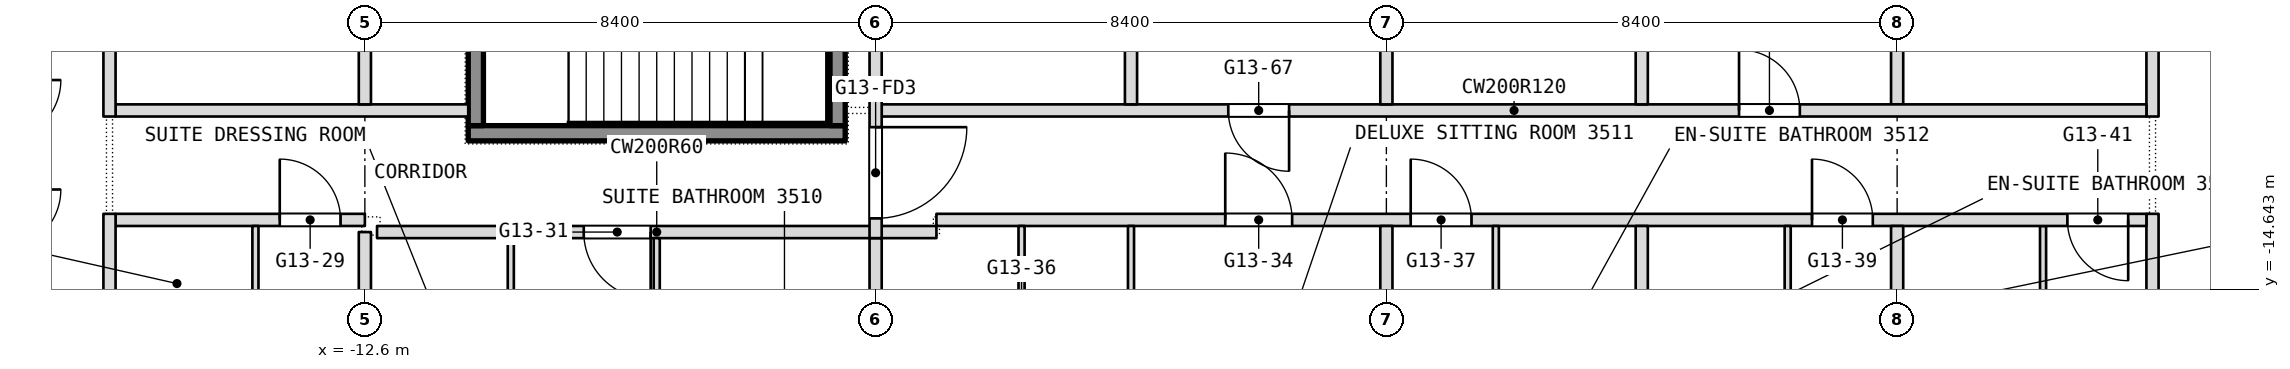
"""IFC4 building model, lengths in metres.
Left out: names, types, materials, properties, quantities, classifications, styles, units other than length and angle.
Written with IfcOpenShell. Run it as: python <this file> out.ifc"""

import sys

from ifc_helpers import new_model, si_unit, direction, frame, frame_2d, origin, place, context, subcontext, project, spatial, rectangle, extrude, element, fill, save


model = new_model("IFC4")
c1 = context("Model", 3, precision=1e-05, world=origin(), true_north=direction((0.0, 1.0)))
c2 = subcontext(c1, "Body", "Model", "MODEL_VIEW")
j1 = project(units=[si_unit("LENGTHUNIT", "METRE"), si_unit("PLANEANGLEUNIT", "RADIAN")], contexts=[c1])
p1 = place(None, origin())
s1 = spatial("IfcSite", under=j1, at=p1, CompositionType="ELEMENT")
p2 = place(p1, origin())
s2 = spatial("IfcBuilding", under=s1, at=p2, CompositionType="ELEMENT")
p3 = place(p2, frame((0.0, 0.0, 151.7)))
s3 = spatial("IfcBuildingStorey", under=s2, at=p3, CompositionType="ELEMENT", Elevation=151.7)
p4 = place(p3, frame((16.8, -22.186, 0.0), z_axis=(0.0, 0.0, 1.0), x_axis=(0.0, 1.0, 0.0)))
e1 = element("IfcWall", 1, at=p4, inside=s3, PredefinedType="PARTITIONING", context=c2, shape_type="SweptSolid", body=[
    extrude(rectangle(XDim=8.786, YDim=0.2, at=frame_2d((4.393, 0.0))), origin(), (0.0, 0.0, 1.0), 3.34),
])
p5 = place(p3, frame((16.8, -11.8, 0.0), z_axis=(0.0, 0.0, 1.0), x_axis=(0.0, 1.0, 0.0)))
e2 = element("IfcWall", 2, at=p5, inside=s3, PredefinedType="PARTITIONING", context=c2, shape_type="SweptSolid", body=[
    extrude(rectangle(XDim=9.9, YDim=0.2, at=frame_2d((4.95, 0.0))), origin(), (0.0, 0.0, 1.0), 3.34),
])
p6 = place(p3, frame((15.0, -16.85, 0.0), z_axis=(0.0, 0.0, 1.0), x_axis=(0.0, 1.0, 0.0)))
e3 = element("IfcWall", 3, at=p6, inside=s3, PredefinedType="PARTITIONING", context=c2, shape_type="SweptSolid", body=[
    extrude(rectangle(XDim=3.25, YDim=0.1, at=frame_2d((1.625, 0.0))), origin(), (0.0, 0.0, 1.0), 3.34),
])
p7 = place(p3, frame((-12.4, -13.7, 0.0), z_axis=(0.0, 0.0, 1.0), x_axis=(1.0, 0.0, 0.0)))
e4 = element("IfcWall", 4, at=p7, inside=s3, PredefinedType="PARTITIONING", context=c2, shape_type="SweptSolid", body=[
    extrude(rectangle(XDim=9.2, YDim=0.2, at=frame_2d((4.6, 0.0))), origin(), (0.0, 0.0, 1.0), 3.34),
])
p8 = place(p7, frame((3.4, 0.0, 0.0)))
e5 = element("IfcOpeningElement", 5, at=p8, cuts=e4, PredefinedType="OPENING", context=c2, shape_type="SweptSolid", body=[
    extrude(rectangle(XDim=1.1, YDim=2.1, at=frame_2d((0.55, 1.05))), frame((0.0, 0.1, 0.0), z_axis=(0.0, -1.0, 0.0), x_axis=(1.0, 0.0, 0.0)), (0.0, 0.0, 1.0), 0.2),
])
p9 = place(p3, frame((-16.7, -13.5, 0.0), z_axis=(0.0, 0.0, 1.0), x_axis=(1.0, 0.0, 0.0)))
e6 = element("IfcWall", 6, at=p9, inside=s3, PredefinedType="PARTITIONING", context=c2, shape_type="SweptSolid", body=[
    extrude(rectangle(XDim=4.1, YDim=0.2, at=frame_2d((2.05, 0.0))), origin(), (0.0, 0.0, 1.0), 3.34),
])
p10 = place(p9, frame((2.7, 0.0, 0.0)))
e7 = element("IfcOpeningElement", 7, at=p10, cuts=e6, PredefinedType="OPENING", context=c2, shape_type="SweptSolid", body=[
    extrude(rectangle(XDim=1.0, YDim=2.1, at=frame_2d((0.5, 1.05))), frame((0.0, 0.1, 0.0), z_axis=(0.0, -1.0, 0.0), x_axis=(1.0, 0.0, 0.0)), (0.0, 0.0, 1.0), 0.2),
])
p11 = place(p3, frame((-3.2, -13.5, 0.0), z_axis=(0.0, 0.0, 1.0), x_axis=(1.0, 0.0, 0.0)))
e8 = element("IfcWall", 8, at=p11, inside=s3, PredefinedType="PARTITIONING", context=c2, shape_type="SweptSolid", body=[
    extrude(rectangle(XDim=19.9, YDim=0.2, at=frame_2d((9.95, 0.0))), origin(), (0.0, 0.0, 1.0), 3.34),
])
p12 = place(p11, frame((4.75, 0.0, 0.0)))
e9 = element("IfcOpeningElement", 9, at=p12, cuts=e8, PredefinedType="OPENING", context=c2, shape_type="SweptSolid", body=[
    extrude(rectangle(XDim=1.1, YDim=2.1, at=frame_2d((0.55, 1.05))), frame((0.0, 0.1, 0.0), z_axis=(0.0, -1.0, 0.0), x_axis=(1.0, 0.0, 0.0)), (0.0, 0.0, 1.0), 0.2),
])
p13 = place(p11, frame((7.8, 0.0, 0.0)))
e10 = element("IfcOpeningElement", 10, at=p13, cuts=e8, PredefinedType="OPENING", context=c2, shape_type="SweptSolid", body=[
    extrude(rectangle(XDim=1.0, YDim=2.1, at=frame_2d((0.5, 1.05))), frame((0.0, 0.1, 0.0), z_axis=(0.0, -1.0, 0.0), x_axis=(1.0, 0.0, 0.0)), (0.0, 0.0, 1.0), 0.2),
])
p14 = place(p11, frame((14.4, 0.0, 0.0)))
e11 = element("IfcOpeningElement", 11, at=p14, cuts=e8, PredefinedType="OPENING", context=c2, shape_type="SweptSolid", body=[
    extrude(rectangle(XDim=1.0, YDim=2.1, at=frame_2d((0.5, 1.05))), frame((0.0, 0.1, 0.0), z_axis=(0.0, -1.0, 0.0), x_axis=(1.0, 0.0, 0.0)), (0.0, 0.0, 1.0), 0.2),
])
p15 = place(p11, frame((18.6, 0.0, 0.0)))
e12 = element("IfcOpeningElement", 12, at=p15, cuts=e8, PredefinedType="OPENING", context=c2, shape_type="SweptSolid", body=[
    extrude(rectangle(XDim=1.0, YDim=2.1, at=frame_2d((0.5, 1.05))), frame((0.0, 0.1, 0.0), z_axis=(0.0, -1.0, 0.0), x_axis=(1.0, 0.0, 0.0)), (0.0, 0.0, 1.0), 0.2),
])
p16 = place(p3, frame((12.6, -21.175, 0.0), z_axis=(0.0, 0.0, 1.0), x_axis=(0.0, 1.0, 0.0)))
e13 = element("IfcWall", 13, at=p16, inside=s3, PredefinedType="PARTITIONING", context=c2, shape_type="SweptSolid", body=[
    extrude(rectangle(XDim=7.575, YDim=0.2, at=frame_2d((3.788, 0.0))), origin(), (0.0, 0.0, 1.0), 3.34),
])
p17 = place(p3, frame((12.6, -11.6, 0.0), z_axis=(0.0, 0.0, 1.0), x_axis=(0.0, 1.0, 0.0)))
e14 = element("IfcWall", 14, at=p17, inside=s3, PredefinedType="PARTITIONING", context=c2, shape_type="SweptSolid", body=[
    extrude(rectangle(XDim=3.9, YDim=0.2, at=frame_2d((1.95, 0.0))), origin(), (0.0, 0.0, 1.0), 3.34),
])
p18 = place(p3, frame((-16.7, -11.7, 0.0), z_axis=(0.0, 0.0, 1.0), x_axis=(1.0, 0.0, 0.0)))
e15 = element("IfcWall", 15, at=p18, inside=s3, PredefinedType="PARTITIONING", context=c2, shape_type="SweptSolid", body=[
    extrude(rectangle(XDim=5.8, YDim=0.2, at=frame_2d((2.9, 0.0))), origin(), (0.0, 0.0, 1.0), 3.34),
])
p19 = place(p3, frame((-4.1, -11.7, 0.0), z_axis=(0.0, 0.0, 1.0), x_axis=(1.0, 0.0, 0.0)))
e16 = element("IfcWall", 16, at=p19, inside=s3, PredefinedType="PARTITIONING", context=c2, shape_type="SweptSolid", body=[
    extrude(rectangle(XDim=20.8, YDim=0.2, at=frame_2d((10.4, 0.0))), origin(), (0.0, 0.0, 1.0), 3.34),
])
p20 = place(p19, frame((14.1, 0.0, 0.0)))
e17 = element("IfcOpeningElement", 17, at=p20, cuts=e16, PredefinedType="OPENING", context=c2, shape_type="SweptSolid", body=[
    extrude(rectangle(XDim=1.0, YDim=2.1, at=frame_2d((0.5, 1.05))), frame((0.0, 0.1, 0.0), z_axis=(0.0, -1.0, 0.0), x_axis=(1.0, 0.0, 0.0)), (0.0, 0.0, 1.0), 0.2),
])
p21 = place(p19, frame((5.7, 0.0, 0.0)))
e18 = element("IfcOpeningElement", 18, at=p21, cuts=e16, PredefinedType="OPENING", context=c2, shape_type="SweptSolid", body=[
    extrude(rectangle(XDim=1.0, YDim=2.1, at=frame_2d((0.5, 1.05))), frame((0.0, 0.1, 0.0), z_axis=(0.0, -1.0, 0.0), x_axis=(1.0, 0.0, 0.0)), (0.0, 0.0, 1.0), 0.2),
])
p22 = place(p3, frame((10.8, -17.65, 0.0), z_axis=(0.0, 0.0, 1.0), x_axis=(0.0, 1.0, 0.0)))
e19 = element("IfcWall", 19, at=p22, inside=s3, PredefinedType="PARTITIONING", context=c2, shape_type="SweptSolid", body=[
    extrude(rectangle(XDim=4.05, YDim=0.1, at=frame_2d((2.025, 0.0))), origin(), (0.0, 0.0, 1.0), 3.34),
])
p23 = place(p3, frame((8.4, -23.3, 0.0), z_axis=(0.0, 0.0, 1.0), x_axis=(0.0, 1.0, 0.0)))
e20 = element("IfcWall", 20, at=p23, inside=s3, PredefinedType="PARTITIONING", context=c2, shape_type="SweptSolid", body=[
    extrude(rectangle(XDim=9.7, YDim=0.2, at=frame_2d((4.85, 0.0))), origin(), (0.0, 0.0, 1.0), 3.34),
])
p24 = place(p3, frame((8.4, -11.6, 0.0), z_axis=(0.0, 0.0, 1.0), x_axis=(0.0, 1.0, 0.0)))
e21 = element("IfcWall", 21, at=p24, inside=s3, PredefinedType="PARTITIONING", context=c2, shape_type="SweptSolid", body=[
    extrude(rectangle(XDim=3.8, YDim=0.2, at=frame_2d((1.9, 0.0))), origin(), (0.0, 0.0, 1.0), 3.34),
])
p25 = place(p3, frame((6.0, -17.75, 0.0), z_axis=(0.0, 0.0, 1.0), x_axis=(0.0, 1.0, 0.0)))
e22 = element("IfcWall", 22, at=p25, inside=s3, PredefinedType="PARTITIONING", context=c2, shape_type="SweptSolid", body=[
    extrude(rectangle(XDim=4.15, YDim=0.1, at=frame_2d((2.075, 0.0))), origin(), (0.0, 0.0, 1.0), 3.34),
])
p26 = place(p3, frame((4.2, -23.3, 0.0), z_axis=(0.0, 0.0, 1.0), x_axis=(0.0, 1.0, 0.0)))
e23 = element("IfcWall", 23, at=p26, inside=s3, PredefinedType="PARTITIONING", context=c2, shape_type="SweptSolid", body=[
    extrude(rectangle(XDim=9.7, YDim=0.2, at=frame_2d((4.85, 0.0))), origin(), (0.0, 0.0, 1.0), 3.34),
])
p27 = place(p3, frame((4.2, -11.6, 0.0), z_axis=(0.0, 0.0, 1.0), x_axis=(0.0, 1.0, 0.0)))
e24 = element("IfcWall", 24, at=p27, inside=s3, PredefinedType="PARTITIONING", context=c2, shape_type="SweptSolid", body=[
    extrude(rectangle(XDim=9.7, YDim=0.2, at=frame_2d((4.85, 0.0))), origin(), (0.0, 0.0, 1.0), 3.34),
])
p28 = place(p3, frame((0.0, -23.3, 0.0), z_axis=(0.0, 0.0, 1.0), x_axis=(0.0, 1.0, 0.0)))
e25 = element("IfcWall", 25, at=p28, inside=s3, PredefinedType="PARTITIONING", context=c2, shape_type="SweptSolid", body=[
    extrude(rectangle(XDim=9.7, YDim=0.1, at=frame_2d((4.85, 0.0))), origin(), (0.0, 0.0, 1.0), 3.34),
])
p29 = place(p28, frame((3.65, 0.0, 0.0)))
e26 = element("IfcOpeningElement", 26, at=p29, cuts=e25, PredefinedType="OPENING", context=c2, shape_type="SweptSolid", body=[
    extrude(rectangle(XDim=0.9, YDim=2.1, at=frame_2d((0.45, 1.05))), frame((0.0, 0.05, 0.0), z_axis=(0.0, -1.0, 0.0), x_axis=(1.0, 0.0, 0.0)), (0.0, 0.0, 1.0), 0.1),
])
p30 = place(p3, frame((0.0, -11.6, 0.0), z_axis=(0.0, 0.0, 1.0), x_axis=(0.0, 1.0, 0.0)))
e27 = element("IfcWall", 27, at=p30, inside=s3, PredefinedType="PARTITIONING", context=c2, shape_type="SweptSolid", body=[
    extrude(rectangle(XDim=9.7, YDim=0.2, at=frame_2d((4.85, 0.0))), origin(), (0.0, 0.0, 1.0), 3.34),
])
p31 = place(p3, frame((-1.8, -17.05, 0.0), z_axis=(0.0, 0.0, 1.0), x_axis=(0.0, 1.0, 0.0)))
e28 = element("IfcWall", 28, at=p31, inside=s3, PredefinedType="PARTITIONING", context=c2, shape_type="SweptSolid", body=[
    extrude(rectangle(XDim=3.45, YDim=0.1, at=frame_2d((1.725, 0.0))), origin(), (0.0, 0.0, 1.0), 3.34),
])
p32 = place(p31, frame((1.3, 0.0, 0.0)))
e29 = element("IfcOpeningElement", 29, at=p32, cuts=e28, PredefinedType="OPENING", context=c2, shape_type="SweptSolid", body=[
    extrude(rectangle(XDim=0.9, YDim=2.1, at=frame_2d((0.45, 1.05))), frame((0.0, 0.05, 0.0), z_axis=(0.0, -1.0, 0.0), x_axis=(1.0, 0.0, 0.0)), (0.0, 0.0, 1.0), 0.1),
])
p33 = place(p3, frame((-4.2, -23.3, 0.0), z_axis=(0.0, 0.0, 1.0), x_axis=(0.0, 1.0, 0.0)))
e30 = element("IfcWall", 30, at=p33, inside=s3, PredefinedType="PARTITIONING", context=c2, shape_type="SweptSolid", body=[
    extrude(rectangle(XDim=9.5, YDim=0.2, at=frame_2d((4.75, 0.0))), origin(), (0.0, 0.0, 1.0), 3.34),
])
p34 = place(p3, frame((-4.2, -13.8, 0.0), z_axis=(0.0, 0.0, 1.0), x_axis=(0.0, 1.0, 0.0)))
e31 = element("IfcWall", 31, at=p34, inside=s3, PredefinedType="PARTITIONING", context=c2, shape_type="SweptSolid", body=[
    extrude(rectangle(XDim=13.8, YDim=0.2, at=frame_2d((6.9, 0.0))), origin(), (0.0, 0.0, 1.0), 3.34),
])
p35 = place(p34, frame((12.15, 0.0, 0.0)))
e32 = element("IfcOpeningElement", 32, at=p35, cuts=e31, PredefinedType="OPENING", context=c2, shape_type="SweptSolid", body=[
    extrude(rectangle(XDim=1.5, YDim=2.1, at=frame_2d((0.75, 1.05))), frame((0.0, 0.1, 0.0), z_axis=(0.0, -1.0, 0.0), x_axis=(1.0, 0.0, 0.0)), (0.0, 0.0, 1.0), 0.2),
])
p36 = place(p34, frame((0.325, 0.0, 0.0)))
e33 = element("IfcOpeningElement", 33, at=p36, cuts=e31, PredefinedType="OPENING", context=c2, shape_type="SweptSolid", body=[
    extrude(rectangle(XDim=1.5, YDim=2.1, at=frame_2d((0.75, 1.05))), frame((0.0, 0.1, 0.0), z_axis=(0.0, -1.0, 0.0), x_axis=(1.0, 0.0, 0.0)), (0.0, 0.0, 1.0), 0.2),
])
p37 = place(p3, frame((-7.8, -17.35, 0.0), z_axis=(0.0, 0.0, 1.0), x_axis=(0.0, 1.0, 0.0)))
e34 = element("IfcWall", 34, at=p37, inside=s3, PredefinedType="PARTITIONING", context=c2, shape_type="SweptSolid", body=[
    extrude(rectangle(XDim=3.55, YDim=0.1, at=frame_2d((1.775, 0.0))), origin(), (0.0, 0.0, 1.0), 3.34),
])
p38 = place(p3, frame((-10.2, -17.25, 0.0), z_axis=(0.0, 0.0, 1.0), x_axis=(0.0, 1.0, 0.0)))
e35 = element("IfcWall", 35, at=p38, inside=s3, PredefinedType="PARTITIONING", context=c2, shape_type="SweptSolid", body=[
    extrude(rectangle(XDim=3.45, YDim=0.1, at=frame_2d((1.725, 0.0))), origin(), (0.0, 0.0, 1.0), 3.34),
])
p39 = place(p3, frame((-12.6, -21.175, 0.0), z_axis=(0.0, 0.0, 1.0), x_axis=(0.0, 1.0, 0.0)))
e36 = element("IfcWall", 36, at=p39, inside=s3, PredefinedType="PARTITIONING", context=c2, shape_type="SweptSolid", body=[
    extrude(rectangle(XDim=7.475, YDim=0.2, at=frame_2d((3.738, 0.0))), origin(), (0.0, 0.0, 1.0), 3.34),
])
p40 = place(p3, frame((-12.6, -11.6, 0.0), z_axis=(0.0, 0.0, 1.0), x_axis=(0.0, 1.0, 0.0)))
e37 = element("IfcWall", 37, at=p40, inside=s3, PredefinedType="PARTITIONING", context=c2, shape_type="SweptSolid", body=[
    extrude(rectangle(XDim=9.7, YDim=0.2, at=frame_2d((4.85, 0.0))), origin(), (0.0, 0.0, 1.0), 3.34),
])
p41 = place(p3, frame((-14.4, -16.45, 0.0), z_axis=(0.0, 0.0, 1.0), x_axis=(0.0, 1.0, 0.0)))
e38 = element("IfcWall", 38, at=p41, inside=s3, PredefinedType="PARTITIONING", context=c2, shape_type="SweptSolid", body=[
    extrude(rectangle(XDim=2.85, YDim=0.1, at=frame_2d((1.425, 0.0))), origin(), (0.0, 0.0, 1.0), 3.34),
])
p42 = place(p3, frame((-16.8, -22.186, 0.0), z_axis=(0.0, 0.0, 1.0), x_axis=(0.0, 1.0, 0.0)))
e39 = element("IfcWall", 39, at=p42, inside=s3, PredefinedType="PARTITIONING", context=c2, shape_type="SweptSolid", body=[
    extrude(rectangle(XDim=8.786, YDim=0.2, at=frame_2d((4.393, 0.0))), origin(), (0.0, 0.0, 1.0), 3.34),
])
p43 = place(p3, frame((-16.8, -11.8, 0.0), z_axis=(0.0, 0.0, 1.0), x_axis=(0.0, 1.0, 0.0)))
e40 = element("IfcWall", 40, at=p43, inside=s3, PredefinedType="PARTITIONING", context=c2, shape_type="SweptSolid", body=[
    extrude(rectangle(XDim=9.9, YDim=0.2, at=frame_2d((4.95, 0.0))), origin(), (0.0, 0.0, 1.0), 3.34),
])
p44 = place(p3, frame((-10.9, -12.075, 0.1), z_axis=(0.0, 0.0, 1.0), x_axis=(1.0, 0.0, 0.0)))
e41 = element("IfcWall", 41, at=p44, inside=s3, PredefinedType="SHEAR", context=c2, shape_type="SweptSolid", body=[
    extrude(rectangle(XDim=6.2, YDim=0.25, at=frame_2d((3.1, 0.0))), origin(), (0.0, 0.0, 1.0), 3.6),
])
for number, where, z_axis, x_axis in (
    (42, (-10.775, -11.95, 0.1), (0.0, 0.0, 1.0), (0.0, 1.0, 0.0)),
    (43, (-4.825, -11.95, 0.1), (0.0, 0.0, 1.0), (0.0, 1.0, 0.0)),
):
    element("IfcWall", number, at=place(p3, frame(where, z_axis=z_axis, x_axis=x_axis)), inside=s3, PredefinedType="SHEAR", context=c2, shape_type="SweptSolid", body=[
        extrude(rectangle(XDim=2.9, YDim=0.25, at=frame_2d((1.45, 0.0))), origin(), (0.0, 0.0, 1.0), 3.6),
    ])
p45 = place(p8, origin())
e44 = element("IfcDoor", 44, at=p45, inside=s3, OperationType="SINGLE_SWING_LEFT", PredefinedType="DOOR", context=c2, shape_type="SweptSolid", body=[
    extrude(rectangle(XDim=1.1, YDim=2.1, at=frame_2d((0.55, 1.05))), frame((0.0, 0.025, 0.0), z_axis=(0.0, -1.0, 0.0), x_axis=(1.0, 0.0, 0.0)), (0.0, 0.0, 1.0), 0.05),
])
fill(e5, e44)
p46 = place(p10, origin())
e45 = element("IfcDoor", 45, at=p46, inside=s3, OperationType="SINGLE_SWING_LEFT", PredefinedType="DOOR", context=c2, shape_type="SweptSolid", body=[
    extrude(rectangle(XDim=1.0, YDim=2.1, at=frame_2d((0.5, 1.05))), frame((0.0, 0.025, 0.0), z_axis=(0.0, -1.0, 0.0), x_axis=(1.0, 0.0, 0.0)), (0.0, 0.0, 1.0), 0.05),
])
fill(e7, e45)
p47 = place(p12, origin())
e46 = element("IfcDoor", 46, at=p47, inside=s3, OperationType="SINGLE_SWING_RIGHT", PredefinedType="DOOR", context=c2, shape_type="SweptSolid", body=[
    extrude(rectangle(XDim=1.1, YDim=2.1, at=frame_2d((0.55, 1.05))), frame((0.0, 0.025, 0.0), z_axis=(0.0, -1.0, 0.0), x_axis=(1.0, 0.0, 0.0)), (0.0, 0.0, 1.0), 0.05),
])
fill(e9, e46)
p48 = place(p13, origin())
e47 = element("IfcDoor", 47, at=p48, inside=s3, OperationType="SINGLE_SWING_LEFT", PredefinedType="DOOR", context=c2, shape_type="SweptSolid", body=[
    extrude(rectangle(XDim=1.0, YDim=2.1, at=frame_2d((0.5, 1.05))), frame((0.0, 0.025, 0.0), z_axis=(0.0, -1.0, 0.0), x_axis=(1.0, 0.0, 0.0)), (0.0, 0.0, 1.0), 0.05),
])
fill(e10, e47)
p49 = place(p14, origin())
e48 = element("IfcDoor", 48, at=p49, inside=s3, OperationType="SINGLE_SWING_LEFT", PredefinedType="DOOR", context=c2, shape_type="SweptSolid", body=[
    extrude(rectangle(XDim=1.0, YDim=2.1, at=frame_2d((0.5, 1.05))), frame((0.0, 0.025, 0.0), z_axis=(0.0, -1.0, 0.0), x_axis=(1.0, 0.0, 0.0)), (0.0, 0.0, 1.0), 0.05),
])
fill(e11, e48)
p50 = place(p15, origin())
e49 = element("IfcDoor", 49, at=p50, inside=s3, OperationType="SINGLE_SWING_LEFT", PredefinedType="DOOR", context=c2, shape_type="SweptSolid", body=[
    extrude(rectangle(XDim=1.0, YDim=2.1, at=frame_2d((0.5, 1.05))), frame((0.0, 0.025, 0.0), z_axis=(0.0, -1.0, 0.0), x_axis=(1.0, 0.0, 0.0)), (0.0, 0.0, 1.0), 0.05),
])
fill(e12, e49)
p51 = place(p20, origin())
e50 = element("IfcDoor", 50, at=p51, inside=s3, OperationType="SINGLE_SWING_LEFT", PredefinedType="DOOR", context=c2, shape_type="SweptSolid", body=[
    extrude(rectangle(XDim=1.0, YDim=2.1, at=frame_2d((0.5, 1.05))), frame((0.0, 0.025, 0.0), z_axis=(0.0, -1.0, 0.0), x_axis=(1.0, 0.0, 0.0)), (0.0, 0.0, 1.0), 0.05),
])
fill(e17, e50)
p52 = place(p21, origin())
e51 = element("IfcDoor", 51, at=p52, inside=s3, OperationType="SINGLE_SWING_LEFT", PredefinedType="DOOR", context=c2, shape_type="SweptSolid", body=[
    extrude(rectangle(XDim=1.0, YDim=2.1, at=frame_2d((0.5, 1.05))), frame((0.0, 0.025, 0.0), z_axis=(0.0, -1.0, 0.0), x_axis=(1.0, 0.0, 0.0)), (0.0, 0.0, 1.0), 0.05),
])
fill(e18, e51)
p53 = place(p36, origin())
e52 = element("IfcDoor", 52, at=p53, inside=s3, OperationType="DOUBLE_DOOR_DOUBLE_SWING", PredefinedType="DOOR", context=c2, shape_type="SweptSolid", body=[
    extrude(rectangle(XDim=1.5, YDim=2.1, at=frame_2d((0.75, 1.05))), frame((0.0, 0.025, 0.0), z_axis=(0.0, -1.0, 0.0), x_axis=(1.0, 0.0, 0.0)), (0.0, 0.0, 1.0), 0.05),
])
fill(e33, e52)
save(model, sys.argv[1])
